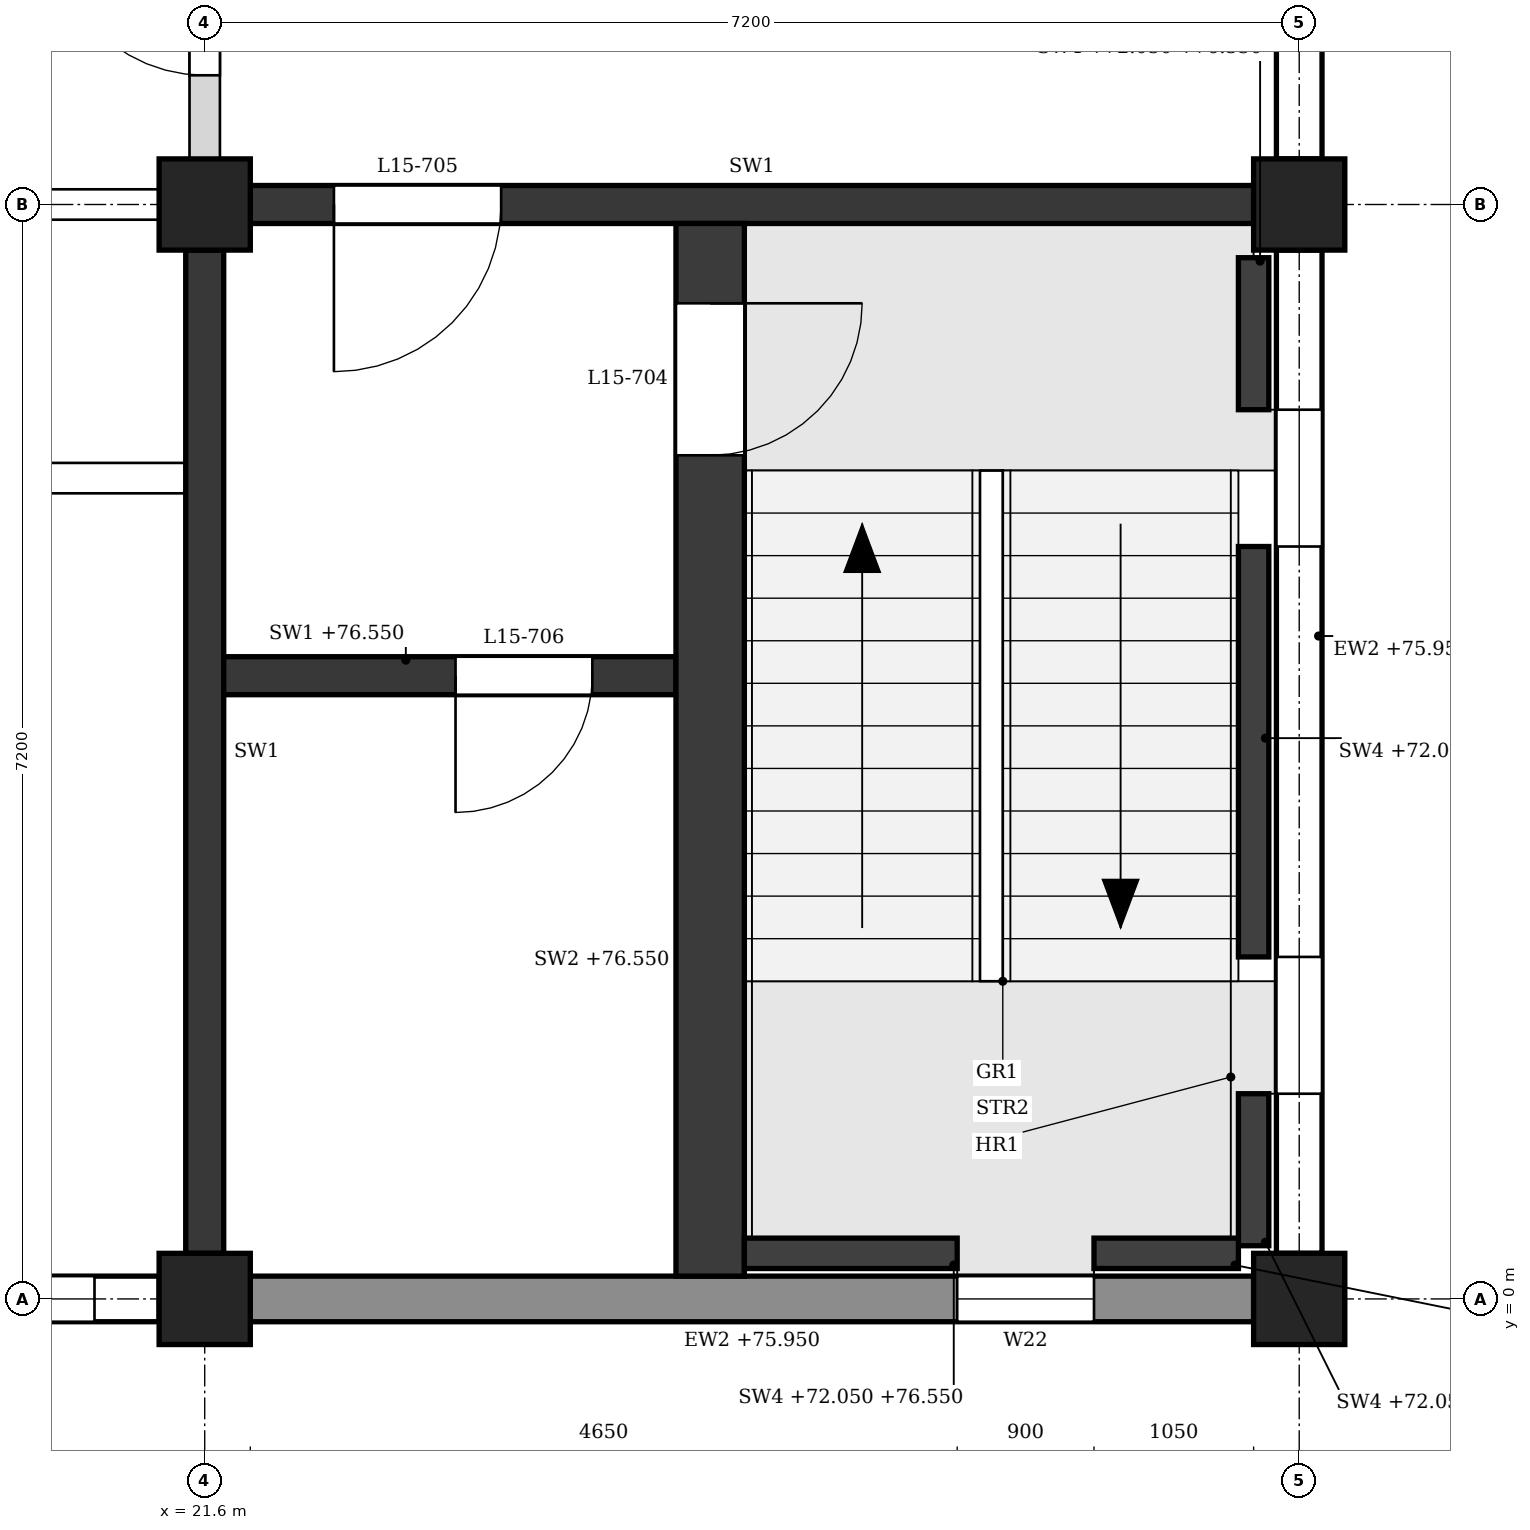
"""IFC4 building model, lengths in metres.
Left out: names, types, materials, properties, quantities, classifications, styles, units other than length and angle.
Written with IfcOpenShell. Run it as: python <this file> out.ifc"""

import sys

from ifc_helpers import new_model, si_unit, direction, frame, frame_2d, origin, origin_2d, place, context, subcontext, project, spatial, polyline, rectangle, outline, extrude, element, fill, save


model = new_model("IFC4")
c1 = context("Model", 3, precision=1e-05, world=origin(), true_north=direction((0.0, 1.0)))
c2 = subcontext(c1, "Body", "Model", "MODEL_VIEW")
j1 = project(units=[si_unit("LENGTHUNIT", "METRE"), si_unit("PLANEANGLEUNIT", "RADIAN")], contexts=[c1])
p1 = place(None, origin())
s1 = spatial("IfcSite", under=j1, at=p1, CompositionType="ELEMENT")
p2 = place(p1, origin())
s2 = spatial("IfcBuilding", under=s1, at=p2, CompositionType="ELEMENT")
p3 = place(p2, frame((0.0, 0.0, 72.3)))
s3 = spatial("IfcBuildingStorey", under=s2, at=p3, CompositionType="ELEMENT", Elevation=72.3)
for number, where, z_axis, x_axis in (
    (1, (21.6, 0.0, 0.0), (0.0, 0.0, 1.0), (1.0, 0.0, 0.0)),
    (2, (21.6, 7.2, 0.0), (0.0, 0.0, 1.0), (1.0, 0.0, 0.0)),
    (3, (28.8, 0.0, 0.0), (0.0, 0.0, 1.0), (1.0, 0.0, 0.0)),
    (4, (28.8, 7.2, 0.0), (0.0, 0.0, 1.0), (1.0, 0.0, 0.0)),
):
    element("IfcColumn", number, at=place(p3, frame(where, z_axis=z_axis, x_axis=x_axis)), inside=s3, PredefinedType="COLUMN", context=c2, shape_type="SweptSolid", body=[
        extrude(rectangle(XDim=0.6, YDim=0.6, at=origin_2d()), origin(), (0.0, 0.0, 1.0), 4.5),
    ])
p4 = place(p3, frame((14.7, 0.0, 0.0), z_axis=(0.0, 0.0, 1.0), x_axis=(1.0, 0.0, 0.0)))
e5 = element("IfcWall", 5, at=p4, inside=s3, PredefinedType="STANDARD", context=c2, shape_type="SweptSolid", body=[
    extrude(rectangle(XDim=6.6, YDim=0.3, at=frame_2d((3.3, 0.0))), origin(), (0.0, 0.0, 1.0), 3.65),
])
p5 = place(p4, frame((0.425, 0.0, 1.5)))
e6 = element("IfcOpeningElement", 6, at=p5, cuts=e5, PredefinedType="OPENING", context=c2, shape_type="SweptSolid", body=[
    extrude(outline(polyline([(0.0, 0.0), (0.45, 0.0), (0.45, 1.85), (0.225, 2.1), (0.0, 1.85), (0.0, 0.0)])), frame((0.0, 0.16, 0.0), z_axis=(0.0, -1.0, 0.0), x_axis=(1.0, 0.0, 0.0)), (0.0, 0.0, 1.0), 0.32),
])
p6 = place(p4, frame((1.125, 0.0, 0.9)))
e7 = element("IfcOpeningElement", 7, at=p6, cuts=e5, PredefinedType="OPENING", context=c2, shape_type="SweptSolid", body=[
    extrude(outline(polyline([(0.0, 0.0), (0.75, 0.0), (0.75, 2.25), (0.375, 2.7), (0.0, 2.25), (0.0, 0.0)])), frame((0.0, 0.16, 0.0), z_axis=(0.0, -1.0, 0.0), x_axis=(1.0, 0.0, 0.0)), (0.0, 0.0, 1.0), 0.32),
])
p7 = place(p4, frame((2.125, 0.0, 1.5)))
e8 = element("IfcOpeningElement", 8, at=p7, cuts=e5, PredefinedType="OPENING", context=c2, shape_type="SweptSolid", body=[
    extrude(outline(polyline([(0.0, 0.0), (0.45, 0.0), (0.45, 1.85), (0.225, 2.1), (0.0, 1.85), (0.0, 0.0)])), frame((0.0, 0.16, 0.0), z_axis=(0.0, -1.0, 0.0), x_axis=(1.0, 0.0, 0.0)), (0.0, 0.0, 1.0), 0.32),
])
p8 = place(p4, frame((4.025, 0.0, 1.5)))
e9 = element("IfcOpeningElement", 9, at=p8, cuts=e5, PredefinedType="OPENING", context=c2, shape_type="SweptSolid", body=[
    extrude(outline(polyline([(0.0, 0.0), (0.45, 0.0), (0.45, 1.85), (0.225, 2.1), (0.0, 1.85), (0.0, 0.0)])), frame((0.0, 0.16, 0.0), z_axis=(0.0, -1.0, 0.0), x_axis=(1.0, 0.0, 0.0)), (0.0, 0.0, 1.0), 0.32),
])
p9 = place(p4, frame((4.725, 0.0, 0.9)))
e10 = element("IfcOpeningElement", 10, at=p9, cuts=e5, PredefinedType="OPENING", context=c2, shape_type="SweptSolid", body=[
    extrude(outline(polyline([(0.0, 0.0), (0.75, 0.0), (0.75, 2.25), (0.375, 2.7), (0.0, 2.25), (0.0, 0.0)])), frame((0.0, 0.16, 0.0), z_axis=(0.0, -1.0, 0.0), x_axis=(1.0, 0.0, 0.0)), (0.0, 0.0, 1.0), 0.32),
])
p10 = place(p4, frame((5.725, 0.0, 1.5)))
e11 = element("IfcOpeningElement", 11, at=p10, cuts=e5, PredefinedType="OPENING", context=c2, shape_type="SweptSolid", body=[
    extrude(outline(polyline([(0.0, 0.0), (0.45, 0.0), (0.45, 1.85), (0.225, 2.1), (0.0, 1.85), (0.0, 0.0)])), frame((0.0, 0.16, 0.0), z_axis=(0.0, -1.0, 0.0), x_axis=(1.0, 0.0, 0.0)), (0.0, 0.0, 1.0), 0.32),
])
p11 = place(p3, frame((21.9, 0.0, 0.0), z_axis=(0.0, 0.0, 1.0), x_axis=(1.0, 0.0, 0.0)))
e12 = element("IfcWall", 12, at=p11, inside=s3, PredefinedType="STANDARD", context=c2, shape_type="SweptSolid", body=[
    extrude(rectangle(XDim=6.6, YDim=0.3, at=frame_2d((3.3, 0.0))), origin(), (0.0, 0.0, 1.0), 3.65),
])
p12 = place(p11, frame((4.65, 0.0, 0.9)))
e13 = element("IfcOpeningElement", 13, at=p12, cuts=e12, PredefinedType="OPENING", context=c2, shape_type="SweptSolid", body=[
    extrude(outline(polyline([(0.0, 0.0), (0.9, 0.0), (0.9, 2.25), (0.45, 2.7), (0.0, 2.25), (0.0, 0.0)])), frame((0.0, 0.16, 0.0), z_axis=(0.0, -1.0, 0.0), x_axis=(1.0, 0.0, 0.0)), (0.0, 0.0, 1.0), 0.32),
])
p13 = place(p3, frame((28.8, 0.3, 0.0), z_axis=(0.0, 0.0, 1.0), x_axis=(0.0, 1.0, 0.0)))
e14 = element("IfcWall", 14, at=p13, inside=s3, PredefinedType="STANDARD", context=c2, shape_type="SweptSolid", body=[
    extrude(rectangle(XDim=6.6, YDim=0.3, at=frame_2d((3.3, 0.0))), origin(), (0.0, 0.0, 1.0), 3.65),
])
p14 = place(p13, frame((1.05, 0.0, 0.9)))
e15 = element("IfcOpeningElement", 15, at=p14, cuts=e14, PredefinedType="OPENING", context=c2, shape_type="SweptSolid", body=[
    extrude(outline(polyline([(0.0, 0.0), (0.9, 0.0), (0.9, 2.25), (0.45, 2.7), (0.0, 2.25), (0.0, 0.0)])), frame((0.0, 0.16, 0.0), z_axis=(0.0, -1.0, 0.0), x_axis=(1.0, 0.0, 0.0)), (0.0, 0.0, 1.0), 0.32),
])
p15 = place(p13, frame((4.65, 0.0, 0.9)))
e16 = element("IfcOpeningElement", 16, at=p15, cuts=e14, PredefinedType="OPENING", context=c2, shape_type="SweptSolid", body=[
    extrude(outline(polyline([(0.0, 0.0), (0.9, 0.0), (0.9, 2.25), (0.45, 2.7), (0.0, 2.25), (0.0, 0.0)])), frame((0.0, 0.16, 0.0), z_axis=(0.0, -1.0, 0.0), x_axis=(1.0, 0.0, 0.0)), (0.0, 0.0, 1.0), 0.32),
])
p16 = place(p3, frame((28.8, 7.5, 0.0), z_axis=(0.0, 0.0, 1.0), x_axis=(0.0, 1.0, 0.0)))
e17 = element("IfcWall", 17, at=p16, inside=s3, PredefinedType="STANDARD", context=c2, shape_type="SweptSolid", body=[
    extrude(rectangle(XDim=6.6, YDim=0.3, at=frame_2d((3.3, 0.0))), origin(), (0.0, 0.0, 1.0), 3.65),
])
p17 = place(p16, frame((0.75, 0.0, 0.9)))
e18 = element("IfcOpeningElement", 18, at=p17, cuts=e17, PredefinedType="OPENING", context=c2, shape_type="SweptSolid", body=[
    extrude(outline(polyline([(0.0, 0.0), (1.5, 0.0), (1.5, 1.95), (0.75, 2.7), (0.0, 1.95), (0.0, 0.0)])), frame((0.0, 0.16, 0.0), z_axis=(0.0, -1.0, 0.0), x_axis=(1.0, 0.0, 0.0)), (0.0, 0.0, 1.0), 0.32),
])
p18 = place(p3, frame((21.9, 7.2, 0.0), z_axis=(0.0, 0.0, 1.0), x_axis=(1.0, 0.0, 0.0)))
e19 = element("IfcWall", 19, at=p18, inside=s3, PredefinedType="SHEAR", context=c2, shape_type="SweptSolid", body=[
    extrude(rectangle(XDim=6.6, YDim=0.25, at=frame_2d((3.3, 0.0))), origin(), (0.0, 0.0, 1.0), 3.6),
])
p19 = place(p18, frame((0.55, 0.0, 0.0)))
e20 = element("IfcOpeningElement", 20, at=p19, cuts=e19, PredefinedType="OPENING", context=c2, shape_type="SweptSolid", body=[
    extrude(rectangle(XDim=1.1, YDim=2.1, at=frame_2d((0.55, 1.05))), frame((0.0, 0.135, 0.0), z_axis=(0.0, -1.0, 0.0), x_axis=(1.0, 0.0, 0.0)), (0.0, 0.0, 1.0), 0.27),
])
p20 = place(p3, frame((21.6, 0.3, 0.0), z_axis=(0.0, 0.0, 1.0), x_axis=(0.0, 1.0, 0.0)))
e21 = element("IfcWall", 21, at=p20, inside=s3, PredefinedType="SHEAR", context=c2, shape_type="SweptSolid", body=[
    extrude(rectangle(XDim=6.6, YDim=0.25, at=frame_2d((3.3, 0.0))), origin(), (0.0, 0.0, 1.0), 3.6),
])
p21 = place(p3, frame((28.5, 0.35, -0.25), z_axis=(0.0, 0.0, 1.0), x_axis=(0.0, 1.0, 0.0)))
e22 = element("IfcWall", 22, at=p21, inside=s3, PredefinedType="SHEAR", context=c2, shape_type="SweptSolid", body=[
    extrude(rectangle(XDim=1.0, YDim=0.2, at=frame_2d((0.5, 0.0))), origin(), (0.0, 0.0, 1.0), 4.5),
])
p22 = place(p3, frame((28.5, 2.25, -0.25), z_axis=(0.0, 0.0, 1.0), x_axis=(0.0, 1.0, 0.0)))
e23 = element("IfcWall", 23, at=p22, inside=s3, PredefinedType="SHEAR", context=c2, shape_type="SweptSolid", body=[
    extrude(rectangle(XDim=2.7, YDim=0.2, at=frame_2d((1.35, 0.0))), origin(), (0.0, 0.0, 1.0), 4.5),
])
p23 = place(p3, frame((28.5, 5.85, -0.25), z_axis=(0.0, 0.0, 1.0), x_axis=(0.0, 1.0, 0.0)))
e24 = element("IfcWall", 24, at=p23, inside=s3, PredefinedType="SHEAR", context=c2, shape_type="SweptSolid", body=[
    extrude(rectangle(XDim=1.0, YDim=0.2, at=frame_2d((0.5, 0.0))), origin(), (0.0, 0.0, 1.0), 4.5),
])
p24 = place(p3, frame((25.15, 0.3, -0.25), z_axis=(0.0, 0.0, 1.0), x_axis=(1.0, 0.0, 0.0)))
e25 = element("IfcWall", 25, at=p24, inside=s3, PredefinedType="SHEAR", context=c2, shape_type="SweptSolid", body=[
    extrude(rectangle(XDim=1.4, YDim=0.2, at=frame_2d((0.7, 0.0))), origin(), (0.0, 0.0, 1.0), 4.5),
])
p25 = place(p3, frame((27.45, 0.3, -0.25), z_axis=(0.0, 0.0, 1.0), x_axis=(1.0, 0.0, 0.0)))
e26 = element("IfcWall", 26, at=p25, inside=s3, PredefinedType="SHEAR", context=c2, shape_type="SweptSolid", body=[
    extrude(rectangle(XDim=0.95, YDim=0.2, at=frame_2d((0.475, 0.0))), origin(), (0.0, 0.0, 1.0), 4.5),
])
p26 = place(p3, frame((24.925, 0.15, 0.0), z_axis=(0.0, 0.0, 1.0), x_axis=(0.0, 1.0, 0.0)))
e27 = element("IfcWall", 27, at=p26, inside=s3, PredefinedType="SHEAR", context=c2, shape_type="SweptSolid", body=[
    extrude(rectangle(XDim=6.925, YDim=0.45, at=frame_2d((3.462, 0.0))), origin(), (0.0, 0.0, 1.0), 4.25),
])
p27 = place(p26, frame((5.4, 0.0, 0.0)))
e28 = element("IfcOpeningElement", 28, at=p27, cuts=e27, PredefinedType="OPENING", context=c2, shape_type="SweptSolid", body=[
    extrude(rectangle(XDim=1.0, YDim=2.1, at=frame_2d((0.5, 1.05))), frame((0.0, 0.235, 0.0), z_axis=(0.0, -1.0, 0.0), x_axis=(1.0, 0.0, 0.0)), (0.0, 0.0, 1.0), 0.47),
])
p28 = place(p3, frame((21.725, 4.1, 0.0), z_axis=(0.0, 0.0, 1.0), x_axis=(1.0, 0.0, 0.0)))
e29 = element("IfcWall", 29, at=p28, inside=s3, PredefinedType="SHEAR", context=c2, shape_type="SweptSolid", body=[
    extrude(rectangle(XDim=2.975, YDim=0.25, at=frame_2d((1.487, 0.0))), origin(), (0.0, 0.0, 1.0), 4.25),
])
p29 = place(p28, frame((1.525, 0.0, 0.0)))
e30 = element("IfcOpeningElement", 30, at=p29, cuts=e29, PredefinedType="OPENING", context=c2, shape_type="SweptSolid", body=[
    extrude(rectangle(XDim=0.9, YDim=2.1, at=frame_2d((0.45, 1.05))), frame((0.0, 0.135, 0.0), z_axis=(0.0, -1.0, 0.0), x_axis=(1.0, 0.0, 0.0)), (0.0, 0.0, 1.0), 0.27),
])
p30 = place(p3, frame((7.325, 5.4, 0.0), z_axis=(0.0, 0.0, 1.0), x_axis=(1.0, 0.0, 0.0)))
e31 = element("IfcWall", 31, at=p30, inside=s3, PredefinedType="PARTITIONING", context=c2, shape_type="SweptSolid", body=[
    extrude(outline(polyline([(0.0, 0.0), (14.15, 0.0), (14.15, 3.6), (14.075, 3.6), (14.075, 4.25), (7.275, 4.25), (7.275, 3.6), (6.875, 3.6), (6.875, 4.25), (0.075, 4.25), (0.075, 3.6), (0.0, 3.6), (0.0, 0.0)])), frame((0.0, 0.1, 0.0), z_axis=(0.0, -1.0, 0.0), x_axis=(1.0, 0.0, 0.0)), (0.0, 0.0, 1.0), 0.2),
])
p31 = place(p30, frame((1.238, 0.0, 0.0)))
e32 = element("IfcOpeningElement", 32, at=p31, cuts=e31, PredefinedType="OPENING", context=c2, shape_type="SweptSolid", body=[
    extrude(rectangle(XDim=1.0, YDim=2.1, at=frame_2d((0.5, 1.05))), frame((0.0, 0.11, 0.0), z_axis=(0.0, -1.0, 0.0), x_axis=(1.0, 0.0, 0.0)), (0.0, 0.0, 1.0), 0.22),
])
p32 = place(p30, frame((4.775, 0.0, 0.0)))
e33 = element("IfcOpeningElement", 33, at=p32, cuts=e31, PredefinedType="OPENING", context=c2, shape_type="SweptSolid", body=[
    extrude(rectangle(XDim=1.0, YDim=2.1, at=frame_2d((0.5, 1.05))), frame((0.0, 0.11, 0.0), z_axis=(0.0, -1.0, 0.0), x_axis=(1.0, 0.0, 0.0)), (0.0, 0.0, 1.0), 0.22),
])
p33 = place(p30, frame((8.375, 0.0, 0.0)))
e34 = element("IfcOpeningElement", 34, at=p33, cuts=e31, PredefinedType="OPENING", context=c2, shape_type="SweptSolid", body=[
    extrude(rectangle(XDim=1.0, YDim=2.1, at=frame_2d((0.5, 1.05))), frame((0.0, 0.11, 0.0), z_axis=(0.0, -1.0, 0.0), x_axis=(1.0, 0.0, 0.0)), (0.0, 0.0, 1.0), 0.22),
])
p34 = place(p30, frame((11.913, 0.0, 0.0)))
e35 = element("IfcOpeningElement", 35, at=p34, cuts=e31, PredefinedType="OPENING", context=c2, shape_type="SweptSolid", body=[
    extrude(rectangle(XDim=1.0, YDim=2.1, at=frame_2d((0.5, 1.05))), frame((0.0, 0.11, 0.0), z_axis=(0.0, -1.0, 0.0), x_axis=(1.0, 0.0, 0.0)), (0.0, 0.0, 1.0), 0.22),
])
p35 = place(p3, frame((14.7, 7.2, 0.0), z_axis=(0.0, 0.0, 1.0), x_axis=(1.0, 0.0, 0.0)))
e36 = element("IfcWall", 36, at=p35, inside=s3, PredefinedType="PARTITIONING", context=c2, shape_type="SweptSolid", body=[
    extrude(rectangle(XDim=6.6, YDim=0.2, at=frame_2d((3.3, 0.0))), origin(), (0.0, 0.0, 1.0), 3.6),
])
p36 = place(p35, frame((4.45, 0.0, 0.0)))
e37 = element("IfcOpeningElement", 37, at=p36, cuts=e36, PredefinedType="OPENING", context=c2, shape_type="SweptSolid", body=[
    extrude(rectangle(XDim=1.0, YDim=2.1, at=frame_2d((0.5, 1.05))), frame((0.0, 0.11, 0.0), z_axis=(0.0, -1.0, 0.0), x_axis=(1.0, 0.0, 0.0)), (0.0, 0.0, 1.0), 0.22),
])
p37 = place(p3, frame((21.6, 7.5, 0.0), z_axis=(0.0, 0.0, 1.0), x_axis=(0.0, 1.0, 0.0)))
e38 = element("IfcWall", 38, at=p37, inside=s3, PredefinedType="PARTITIONING", context=c2, shape_type="SweptSolid", body=[
    extrude(rectangle(XDim=2.825, YDim=0.2, at=frame_2d((1.413, 0.0))), origin(), (0.0, 0.0, 1.0), 3.6),
])
p38 = place(p37, frame((0.55, 0.0, 0.0)))
e39 = element("IfcOpeningElement", 39, at=p38, cuts=e38, PredefinedType="OPENING", context=c2, shape_type="SweptSolid", body=[
    extrude(rectangle(XDim=1.0, YDim=2.1, at=frame_2d((0.5, 1.05))), frame((0.0, 0.11, 0.0), z_axis=(0.0, -1.0, 0.0), x_axis=(1.0, 0.0, 0.0)), (0.0, 0.0, 1.0), 0.22),
])
p39 = place(p14, origin())
e40 = element("IfcWindow", 40, at=p39, inside=s3, PartitioningType="SINGLE_PANEL", PredefinedType="WINDOW", context=c2, shape_type="SweptSolid", body=[
    extrude(outline(polyline([(0.0, 0.0), (0.9, 0.0), (0.9, 2.25), (0.45, 2.7), (0.0, 2.25), (0.0, 0.0)])), frame((0.0, 0.03, 0.0), z_axis=(0.0, -1.0, 0.0), x_axis=(1.0, 0.0, 0.0)), (0.0, 0.0, 1.0), 0.06),
])
fill(e15, e40)
p40 = place(p15, origin())
e41 = element("IfcWindow", 41, at=p40, inside=s3, PartitioningType="SINGLE_PANEL", PredefinedType="WINDOW", context=c2, shape_type="SweptSolid", body=[
    extrude(outline(polyline([(0.0, 0.0), (0.9, 0.0), (0.9, 2.25), (0.45, 2.7), (0.0, 2.25), (0.0, 0.0)])), frame((0.0, 0.03, 0.0), z_axis=(0.0, -1.0, 0.0), x_axis=(1.0, 0.0, 0.0)), (0.0, 0.0, 1.0), 0.06),
])
fill(e16, e41)
p41 = place(p10, origin())
e42 = element("IfcWindow", 42, at=p41, inside=s3, PartitioningType="SINGLE_PANEL", PredefinedType="WINDOW", context=c2, shape_type="SweptSolid", body=[
    extrude(outline(polyline([(0.0, 0.0), (0.45, 0.0), (0.45, 1.85), (0.225, 2.1), (0.0, 1.85), (0.0, 0.0)])), frame((0.0, 0.03, 0.0), z_axis=(0.0, -1.0, 0.0), x_axis=(1.0, 0.0, 0.0)), (0.0, 0.0, 1.0), 0.06),
])
fill(e11, e42)
p42 = place(p12, origin())
e43 = element("IfcWindow", 43, at=p42, inside=s3, PartitioningType="SINGLE_PANEL", PredefinedType="WINDOW", context=c2, shape_type="SweptSolid", body=[
    extrude(outline(polyline([(0.0, 0.0), (0.9, 0.0), (0.9, 2.25), (0.45, 2.7), (0.0, 2.25), (0.0, 0.0)])), frame((0.0, 0.03, 0.0), z_axis=(0.0, -1.0, 0.0), x_axis=(1.0, 0.0, 0.0)), (0.0, 0.0, 1.0), 0.06),
])
fill(e13, e43)
p43 = place(p27, frame((1.0, 0.0, 0.0), z_axis=(0.0, 0.0, 1.0), x_axis=(-1.0, 0.0, 0.0)))
e44 = element("IfcDoor", 44, at=p43, inside=s3, OperationType="SINGLE_SWING_LEFT", PredefinedType="DOOR", context=c2, shape_type="SweptSolid", body=[
    extrude(rectangle(XDim=1.0, YDim=2.1, at=frame_2d((0.5, 1.05))), frame((0.0, 0.025, 0.0), z_axis=(0.0, -1.0, 0.0), x_axis=(1.0, 0.0, 0.0)), (0.0, 0.0, 1.0), 0.05),
])
fill(e28, e44)
p44 = place(p19, frame((1.1, 0.0, 0.0), z_axis=(0.0, 0.0, 1.0), x_axis=(-1.0, 0.0, 0.0)))
e45 = element("IfcDoor", 45, at=p44, inside=s3, OperationType="SINGLE_SWING_RIGHT", PredefinedType="DOOR", context=c2, shape_type="SweptSolid", body=[
    extrude(rectangle(XDim=1.1, YDim=2.1, at=frame_2d((0.55, 1.05))), frame((0.0, 0.025, 0.0), z_axis=(0.0, -1.0, 0.0), x_axis=(1.0, 0.0, 0.0)), (0.0, 0.0, 1.0), 0.05),
])
fill(e20, e45)
p45 = place(p29, frame((0.9, 0.0, 0.0), z_axis=(0.0, 0.0, 1.0), x_axis=(-1.0, 0.0, 0.0)))
e46 = element("IfcDoor", 46, at=p45, inside=s3, OperationType="SINGLE_SWING_RIGHT", PredefinedType="DOOR", context=c2, shape_type="SweptSolid", body=[
    extrude(rectangle(XDim=0.9, YDim=2.1, at=frame_2d((0.45, 1.05))), frame((0.0, 0.025, 0.0), z_axis=(0.0, -1.0, 0.0), x_axis=(1.0, 0.0, 0.0)), (0.0, 0.0, 1.0), 0.05),
])
fill(e30, e46)
p46 = place(p38, origin())
e47 = element("IfcDoor", 47, at=p46, inside=s3, OperationType="SINGLE_SWING_RIGHT", PredefinedType="DOOR", context=c2, shape_type="SweptSolid", body=[
    extrude(rectangle(XDim=1.0, YDim=2.1, at=frame_2d((0.5, 1.05))), frame((0.0, 0.025, 0.0), z_axis=(0.0, -1.0, 0.0), x_axis=(1.0, 0.0, 0.0)), (0.0, 0.0, 1.0), 0.05),
])
fill(e39, e47)
save(model, sys.argv[1])
